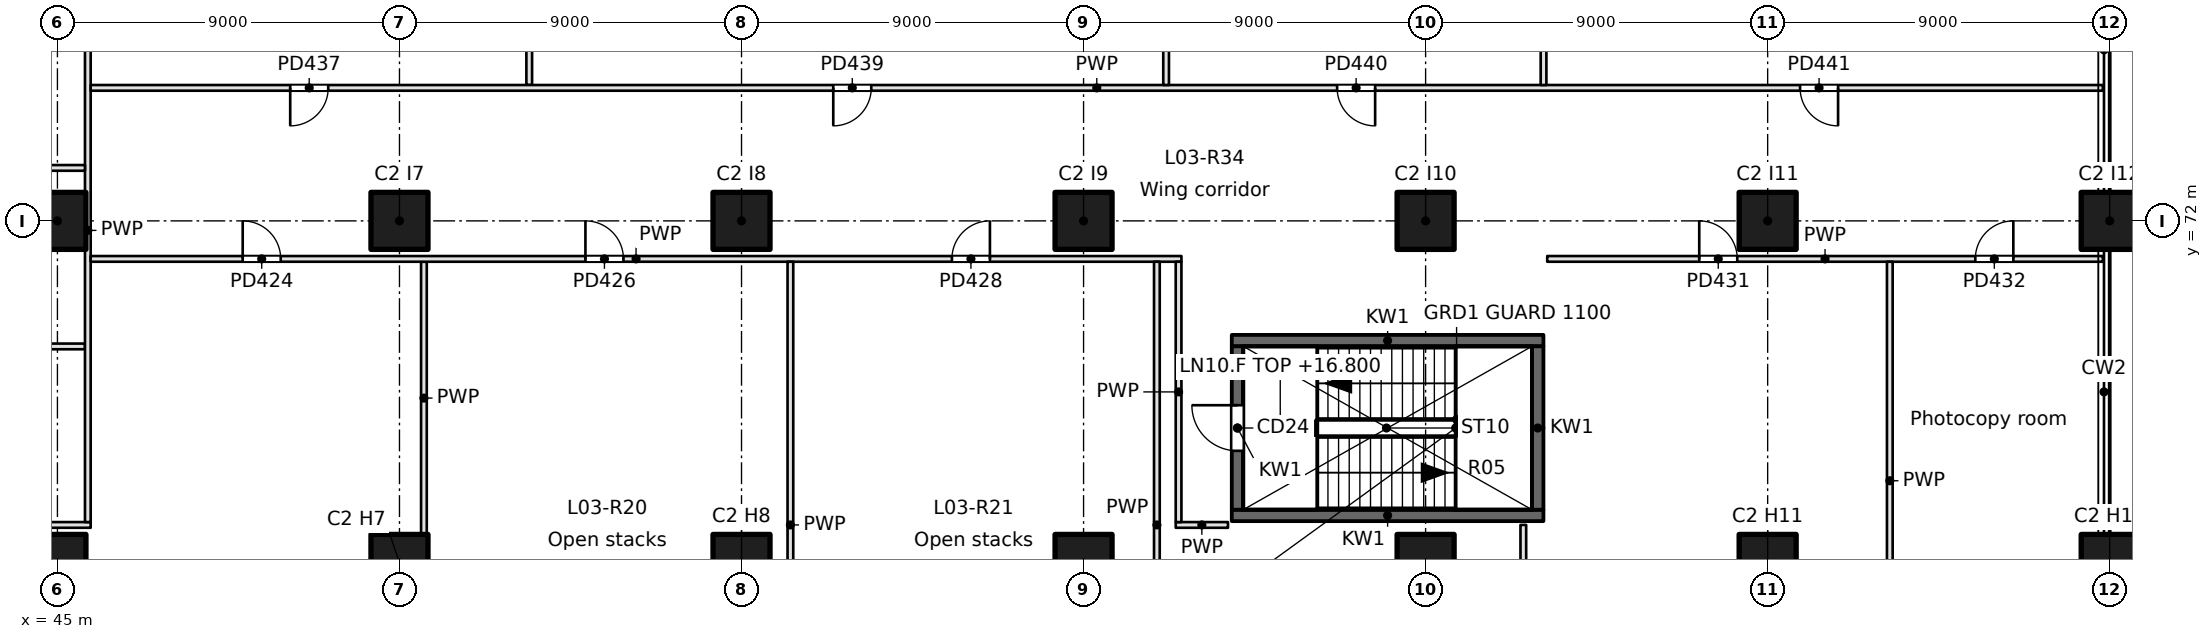
"""IFC4 building model, lengths in metres.
Left out: names, types, materials, properties, quantities, classifications, styles, units other than length and angle.
Written with IfcOpenShell. Run it as: python <this file> out.ifc"""

import sys

from ifc_helpers import new_model, si_unit, direction, frame, frame_2d, origin, origin_2d, place, context, subcontext, project, spatial, rectangle, extrude, element, fill, save


model = new_model("IFC4")
c1 = context("Model", 3, precision=1e-05, world=origin(), true_north=direction((0.0, 1.0)))
c2 = subcontext(c1, "Body", "Model", "MODEL_VIEW")
j1 = project(units=[si_unit("LENGTHUNIT", "METRE"), si_unit("PLANEANGLEUNIT", "RADIAN")], contexts=[c1])
p1 = place(None, origin())
s1 = spatial("IfcSite", under=j1, at=p1, CompositionType="ELEMENT")
p2 = place(p1, origin())
s2 = spatial("IfcBuilding", under=s1, at=p2, CompositionType="ELEMENT")
p3 = place(p2, frame((0.0, 0.0, 16.8)))
s3 = spatial("IfcBuildingStorey", under=s2, at=p3, CompositionType="ELEMENT", Elevation=16.8)
for number, where, z_axis, x_axis in (
    (1, (99.0, 63.0, 0.0), (0.0, 0.0, 1.0), (1.0, 0.0, 0.0)),
    (2, (99.0, 72.0, 0.0), (0.0, 0.0, 1.0), (1.0, 0.0, 0.0)),
    (3, (45.0, 63.0, 0.0), (0.0, 0.0, 1.0), (1.0, 0.0, 0.0)),
    (4, (45.0, 72.0, 0.0), (0.0, 0.0, 1.0), (1.0, 0.0, 0.0)),
    (5, (54.0, 63.0, 0.0), (0.0, 0.0, 1.0), (1.0, 0.0, 0.0)),
    (6, (54.0, 72.0, 0.0), (0.0, 0.0, 1.0), (1.0, 0.0, 0.0)),
    (7, (63.0, 63.0, 0.0), (0.0, 0.0, 1.0), (1.0, 0.0, 0.0)),
    (8, (63.0, 72.0, 0.0), (0.0, 0.0, 1.0), (1.0, 0.0, 0.0)),
    (9, (72.0, 63.0, 0.0), (0.0, 0.0, 1.0), (1.0, 0.0, 0.0)),
    (10, (72.0, 72.0, 0.0), (0.0, 0.0, 1.0), (1.0, 0.0, 0.0)),
    (11, (81.0, 63.0, 0.0), (0.0, 0.0, 1.0), (1.0, 0.0, 0.0)),
    (12, (81.0, 72.0, 0.0), (0.0, 0.0, 1.0), (1.0, 0.0, 0.0)),
    (13, (90.0, 63.0, 0.0), (0.0, 0.0, 1.0), (1.0, 0.0, 0.0)),
    (14, (90.0, 72.0, 0.0), (0.0, 0.0, 1.0), (1.0, 0.0, 0.0)),
):
    element("IfcColumn", number, at=place(p3, frame(where, z_axis=z_axis, x_axis=x_axis)), inside=s3, PredefinedType="COLUMN", context=c2, shape_type="SweptSolid", body=[
        extrude(rectangle(XDim=1.5, YDim=1.5, at=origin_2d()), origin(), (0.0, 0.0, 1.0), 4.8),
    ])
for number, where, z_axis, x_axis in (
    (15, (75.9, 64.25, -0.35), (0.0, 0.0, 1.0), (1.0, 0.0, 0.0)),
    (16, (75.9, 68.85, -0.35), (0.0, 0.0, 1.0), (1.0, 0.0, 0.0)),
):
    element("IfcWall", number, at=place(p3, frame(where, z_axis=z_axis, x_axis=x_axis)), inside=s3, PredefinedType="SOLIDWALL", context=c2, shape_type="SweptSolid", body=[
        extrude(rectangle(XDim=8.2, YDim=0.3, at=frame_2d((4.1, 0.0))), origin(), (0.0, 0.0, 1.0), 4.8),
    ])
p4 = place(p3, frame((76.05, 64.4, -0.35), z_axis=(0.0, 0.0, 1.0), x_axis=(0.0, 1.0, 0.0)))
e17 = element("IfcWall", 17, at=p4, inside=s3, PredefinedType="SOLIDWALL", context=c2, shape_type="SweptSolid", body=[
    extrude(rectangle(XDim=4.3, YDim=0.3, at=frame_2d((2.15, 0.0))), origin(), (0.0, 0.0, 1.0), 4.8),
])
p5 = place(p4, frame((1.55, 0.0, 0.35)))
e18 = element("IfcOpeningElement", 18, at=p5, cuts=e17, PredefinedType="OPENING", context=c2, shape_type="SweptSolid", body=[
    extrude(rectangle(XDim=1.2, YDim=2.1, at=frame_2d((0.6, 1.05))), frame((0.0, 0.15, 0.0), z_axis=(0.0, -1.0, 0.0), x_axis=(1.0, 0.0, 0.0)), (0.0, 0.0, 1.0), 0.3),
])
p6 = place(p3, frame((83.95, 64.4, -0.35), z_axis=(0.0, 0.0, 1.0), x_axis=(0.0, 1.0, 0.0)))
e19 = element("IfcWall", 19, at=p6, inside=s3, PredefinedType="SOLIDWALL", context=c2, shape_type="SweptSolid", body=[
    extrude(rectangle(XDim=4.3, YDim=0.3, at=frame_2d((2.15, 0.0))), origin(), (0.0, 0.0, 1.0), 4.8),
])
p7 = place(p3, frame((40.575, 68.697, 0.0), z_axis=(0.0, 0.0, 1.0), x_axis=(1.0, 0.0, 0.0)))
e20 = element("IfcWall", 20, at=p7, inside=s3, PredefinedType="PARTITIONING", context=c2, shape_type="SweptSolid", body=[
    extrude(rectangle(XDim=5.15, YDim=0.15, at=frame_2d((2.575, 0.0))), origin(), (0.0, 0.0, 1.0), 4.45),
])
p8 = place(p3, frame((45.875, 64.0, 0.0), z_axis=(0.0, 0.0, 1.0), x_axis=(-1.0, 0.0, 0.0)))
e21 = element("IfcWall", 21, at=p8, inside=s3, PredefinedType="PARTITIONING", context=c2, shape_type="SweptSolid", body=[
    extrude(rectangle(XDim=5.45, YDim=0.15, at=frame_2d((2.725, 0.0))), origin(), (0.0, 0.0, 1.0), 4.45),
])
p9 = place(p3, frame((74.425, 64.0, 0.0), z_axis=(0.0, 0.0, 1.0), x_axis=(1.0, 0.0, 0.0)))
e22 = element("IfcWall", 22, at=p9, inside=s3, PredefinedType="PARTITIONING", context=c2, shape_type="SweptSolid", body=[
    extrude(rectangle(XDim=1.375, YDim=0.15, at=frame_2d((0.688, 0.0))), origin(), (0.0, 0.0, 1.0), 4.45),
])
p10 = place(p3, frame((45.8, 79.425, 0.0), z_axis=(0.0, 0.0, 1.0), x_axis=(0.0, -1.0, 0.0)))
e23 = element("IfcWall", 23, at=p10, inside=s3, PredefinedType="PARTITIONING", context=c2, shape_type="SweptSolid", body=[
    extrude(rectangle(XDim=15.35, YDim=0.15, at=frame_2d((7.675, 0.0))), origin(), (0.0, 0.0, 1.0), 4.45),
])
p11 = place(p3, frame((40.575, 73.394, 0.0), z_axis=(0.0, 0.0, 1.0), x_axis=(1.0, 0.0, 0.0)))
e24 = element("IfcWall", 24, at=p11, inside=s3, PredefinedType="PARTITIONING", context=c2, shape_type="SweptSolid", body=[
    extrude(rectangle(XDim=5.15, YDim=0.15, at=frame_2d((2.575, 0.0))), origin(), (0.0, 0.0, 1.0), 4.45),
])
p12 = place(p3, frame((54.643, 63.75, 0.0), z_axis=(0.0, 0.0, 1.0), x_axis=(0.0, 1.0, 0.0)))
e25 = element("IfcWall", 25, at=p12, inside=s3, PredefinedType="PARTITIONING", context=c2, shape_type="SweptSolid", body=[
    extrude(rectangle(XDim=7.175, YDim=0.15, at=frame_2d((3.587, 0.0))), origin(), (0.0, 0.0, 1.0), 4.45),
])
p13 = place(p3, frame((45.875, 71.0, 0.0), z_axis=(0.0, 0.0, 1.0), x_axis=(1.0, 0.0, 0.0)))
e26 = element("IfcWall", 26, at=p13, inside=s3, PredefinedType="PARTITIONING", context=c2, shape_type="SweptSolid", body=[
    extrude(rectangle(XDim=28.7, YDim=0.15, at=frame_2d((14.35, 0.0))), origin(), (0.0, 0.0, 1.0), 4.45),
])
p14 = place(p13, frame((4.0, 0.0, 0.0)))
e27 = element("IfcOpeningElement", 27, at=p14, cuts=e26, PredefinedType="OPENING", context=c2, shape_type="SweptSolid", body=[
    extrude(rectangle(XDim=1.0, YDim=2.1, at=frame_2d((0.5, 1.05))), frame((0.0, 0.075, 0.0), z_axis=(0.0, -1.0, 0.0), x_axis=(1.0, 0.0, 0.0)), (0.0, 0.0, 1.0), 0.15),
])
p15 = place(p13, frame((13.018, 0.0, 0.0)))
e28 = element("IfcOpeningElement", 28, at=p15, cuts=e26, PredefinedType="OPENING", context=c2, shape_type="SweptSolid", body=[
    extrude(rectangle(XDim=1.0, YDim=2.1, at=frame_2d((0.5, 1.05))), frame((0.0, 0.075, 0.0), z_axis=(0.0, -1.0, 0.0), x_axis=(1.0, 0.0, 0.0)), (0.0, 0.0, 1.0), 0.15),
])
p16 = place(p13, frame((22.661, 0.0, 0.0)))
e29 = element("IfcOpeningElement", 29, at=p16, cuts=e26, PredefinedType="OPENING", context=c2, shape_type="SweptSolid", body=[
    extrude(rectangle(XDim=1.0, YDim=2.1, at=frame_2d((0.5, 1.05))), frame((0.0, 0.075, 0.0), z_axis=(0.0, -1.0, 0.0), x_axis=(1.0, 0.0, 0.0)), (0.0, 0.0, 1.0), 0.15),
])
p17 = place(p3, frame((84.2, 71.0, 0.0), z_axis=(0.0, 0.0, 1.0), x_axis=(1.0, 0.0, 0.0)))
e30 = element("IfcWall", 30, at=p17, inside=s3, PredefinedType="PARTITIONING", context=c2, shape_type="SweptSolid", body=[
    extrude(rectangle(XDim=14.62, YDim=0.15, at=frame_2d((7.31, 0.0))), origin(), (0.0, 0.0, 1.0), 4.45),
])
p18 = place(p17, frame((4.0, 0.0, 0.0)))
e31 = element("IfcOpeningElement", 31, at=p18, cuts=e30, PredefinedType="OPENING", context=c2, shape_type="SweptSolid", body=[
    extrude(rectangle(XDim=1.0, YDim=2.1, at=frame_2d((0.5, 1.05))), frame((0.0, 0.075, 0.0), z_axis=(0.0, -1.0, 0.0), x_axis=(1.0, 0.0, 0.0)), (0.0, 0.0, 1.0), 0.15),
])
p19 = place(p17, frame((11.264, 0.0, 0.0)))
e32 = element("IfcOpeningElement", 32, at=p19, cuts=e30, PredefinedType="OPENING", context=c2, shape_type="SweptSolid", body=[
    extrude(rectangle(XDim=1.0, YDim=2.1, at=frame_2d((0.5, 1.05))), frame((0.0, 0.075, 0.0), z_axis=(0.0, -1.0, 0.0), x_axis=(1.0, 0.0, 0.0)), (0.0, 0.0, 1.0), 0.15),
])
for number, where, z_axis, x_axis in (
    (33, (64.286, 57.075, 0.0), (0.0, 0.0, 1.0), (0.0, 1.0, 0.0)),
    (34, (73.929, 57.075, 0.0), (0.0, 0.0, 1.0), (0.0, 1.0, 0.0)),
):
    element("IfcWall", number, at=place(p3, frame(where, z_axis=z_axis, x_axis=x_axis)), inside=s3, PredefinedType="PARTITIONING", context=c2, shape_type="SweptSolid", body=[
        extrude(rectangle(XDim=13.85, YDim=0.15, at=frame_2d((6.925, 0.0))), origin(), (0.0, 0.0, 1.0), 4.45),
    ])
p20 = place(p3, frame((83.571, 57.075, 0.0), z_axis=(0.0, 0.0, 1.0), x_axis=(0.0, 1.0, 0.0)))
e35 = element("IfcWall", 35, at=p20, inside=s3, PredefinedType="PARTITIONING", context=c2, shape_type="SweptSolid", body=[
    extrude(rectangle(XDim=6.925, YDim=0.15, at=frame_2d((3.462, 0.0))), origin(), (0.0, 0.0, 1.0), 4.45),
])
p21 = place(p3, frame((74.5, 70.925, 0.0), z_axis=(0.0, 0.0, 1.0), x_axis=(0.0, -1.0, 0.0)))
e36 = element("IfcWall", 36, at=p21, inside=s3, PredefinedType="PARTITIONING", context=c2, shape_type="SweptSolid", body=[
    extrude(rectangle(XDim=6.85, YDim=0.15, at=frame_2d((3.425, 0.0))), origin(), (0.0, 0.0, 1.0), 4.45),
])
p22 = place(p3, frame((93.214, 59.4, 0.0), z_axis=(0.0, 0.0, 1.0), x_axis=(0.0, 1.0, 0.0)))
e37 = element("IfcWall", 37, at=p22, inside=s3, PredefinedType="PARTITIONING", context=c2, shape_type="SweptSolid", body=[
    extrude(rectangle(XDim=11.525, YDim=0.15, at=frame_2d((5.763, 0.0))), origin(), (0.0, 0.0, 1.0), 4.45),
])
p23 = place(p3, frame((57.414, 75.575, 0.0), z_axis=(0.0, 0.0, 1.0), x_axis=(0.0, 1.0, 0.0)))
e38 = element("IfcWall", 38, at=p23, inside=s3, PredefinedType="PARTITIONING", context=c2, shape_type="SweptSolid", body=[
    extrude(rectangle(XDim=17.925, YDim=0.15, at=frame_2d((8.962, 0.0))), origin(), (0.0, 0.0, 1.0), 4.45),
])
p24 = place(p3, frame((98.82, 75.5, 0.0), z_axis=(0.0, 0.0, 1.0), x_axis=(-1.0, 0.0, 0.0)))
e39 = element("IfcWall", 39, at=p24, inside=s3, PredefinedType="PARTITIONING", context=c2, shape_type="SweptSolid", body=[
    extrude(rectangle(XDim=52.945, YDim=0.15, at=frame_2d((26.473, 0.0))), origin(), (0.0, 0.0, 1.0), 4.45),
])
p25 = place(p24, frame((46.695, 0.0, 0.0)))
e40 = element("IfcOpeningElement", 40, at=p25, cuts=e39, PredefinedType="OPENING", context=c2, shape_type="SweptSolid", body=[
    extrude(rectangle(XDim=1.0, YDim=2.1, at=frame_2d((0.5, 1.05))), frame((0.0, 0.075, 0.0), z_axis=(0.0, -1.0, 0.0), x_axis=(1.0, 0.0, 0.0)), (0.0, 0.0, 1.0), 0.15),
])
p26 = place(p24, frame((32.406, 0.0, 0.0)))
e41 = element("IfcOpeningElement", 41, at=p26, cuts=e39, PredefinedType="OPENING", context=c2, shape_type="SweptSolid", body=[
    extrude(rectangle(XDim=1.0, YDim=2.1, at=frame_2d((0.5, 1.05))), frame((0.0, 0.075, 0.0), z_axis=(0.0, -1.0, 0.0), x_axis=(1.0, 0.0, 0.0)), (0.0, 0.0, 1.0), 0.15),
])
p27 = place(p24, frame((19.148, 0.0, 0.0)))
e42 = element("IfcOpeningElement", 42, at=p27, cuts=e39, PredefinedType="OPENING", context=c2, shape_type="SweptSolid", body=[
    extrude(rectangle(XDim=1.0, YDim=2.1, at=frame_2d((0.5, 1.05))), frame((0.0, 0.075, 0.0), z_axis=(0.0, -1.0, 0.0), x_axis=(1.0, 0.0, 0.0)), (0.0, 0.0, 1.0), 0.15),
])
p28 = place(p24, frame((6.967, 0.0, 0.0)))
e43 = element("IfcOpeningElement", 43, at=p28, cuts=e39, PredefinedType="OPENING", context=c2, shape_type="SweptSolid", body=[
    extrude(rectangle(XDim=1.0, YDim=2.1, at=frame_2d((0.5, 1.05))), frame((0.0, 0.075, 0.0), z_axis=(0.0, -1.0, 0.0), x_axis=(1.0, 0.0, 0.0)), (0.0, 0.0, 1.0), 0.15),
])
p29 = place(p3, frame((74.172, 75.575, 0.0), z_axis=(0.0, 0.0, 1.0), x_axis=(0.0, 1.0, 0.0)))
e44 = element("IfcWall", 44, at=p29, inside=s3, PredefinedType="PARTITIONING", context=c2, shape_type="SweptSolid", body=[
    extrude(rectangle(XDim=17.925, YDim=0.15, at=frame_2d((8.962, 0.0))), origin(), (0.0, 0.0, 1.0), 4.45),
])
p30 = place(p3, frame((84.103, 75.575, 0.0), z_axis=(0.0, 0.0, 1.0), x_axis=(0.0, 1.0, 0.0)))
e45 = element("IfcWall", 45, at=p30, inside=s3, PredefinedType="PARTITIONING", context=c2, shape_type="SweptSolid", body=[
    extrude(rectangle(XDim=22.525, YDim=0.15, at=frame_2d((11.263, 0.0))), origin(), (0.0, 0.0, 1.0), 4.45),
])
p31 = place(p5, origin())
e46 = element("IfcDoor", 46, at=p31, inside=s3, OperationType="SINGLE_SWING_RIGHT", PredefinedType="DOOR", context=c2, shape_type="SweptSolid", body=[
    extrude(rectangle(XDim=1.2, YDim=2.1, at=frame_2d((0.6, 1.05))), frame((0.0, 0.025, 0.0), z_axis=(0.0, -1.0, 0.0), x_axis=(1.0, 0.0, 0.0)), (0.0, 0.0, 1.0), 0.05),
])
fill(e18, e46)
p32 = place(p14, origin())
e47 = element("IfcDoor", 47, at=p32, inside=s3, OperationType="SINGLE_SWING_LEFT", PredefinedType="DOOR", context=c2, shape_type="SweptSolid", body=[
    extrude(rectangle(XDim=1.0, YDim=2.1, at=frame_2d((0.5, 1.05))), frame((0.0, 0.025, 0.0), z_axis=(0.0, -1.0, 0.0), x_axis=(1.0, 0.0, 0.0)), (0.0, 0.0, 1.0), 0.05),
])
fill(e27, e47)
p33 = place(p15, origin())
e48 = element("IfcDoor", 48, at=p33, inside=s3, OperationType="SINGLE_SWING_LEFT", PredefinedType="DOOR", context=c2, shape_type="SweptSolid", body=[
    extrude(rectangle(XDim=1.0, YDim=2.1, at=frame_2d((0.5, 1.05))), frame((0.0, 0.025, 0.0), z_axis=(0.0, -1.0, 0.0), x_axis=(1.0, 0.0, 0.0)), (0.0, 0.0, 1.0), 0.05),
])
fill(e28, e48)
p34 = place(p16, origin())
e49 = element("IfcDoor", 49, at=p34, inside=s3, OperationType="SINGLE_SWING_RIGHT", PredefinedType="DOOR", context=c2, shape_type="SweptSolid", body=[
    extrude(rectangle(XDim=1.0, YDim=2.1, at=frame_2d((0.5, 1.05))), frame((0.0, 0.025, 0.0), z_axis=(0.0, -1.0, 0.0), x_axis=(1.0, 0.0, 0.0)), (0.0, 0.0, 1.0), 0.05),
])
fill(e29, e49)
p35 = place(p18, origin())
e50 = element("IfcDoor", 50, at=p35, inside=s3, OperationType="SINGLE_SWING_LEFT", PredefinedType="DOOR", context=c2, shape_type="SweptSolid", body=[
    extrude(rectangle(XDim=1.0, YDim=2.1, at=frame_2d((0.5, 1.05))), frame((0.0, 0.025, 0.0), z_axis=(0.0, -1.0, 0.0), x_axis=(1.0, 0.0, 0.0)), (0.0, 0.0, 1.0), 0.05),
])
fill(e31, e50)
p36 = place(p19, origin())
e51 = element("IfcDoor", 51, at=p36, inside=s3, OperationType="SINGLE_SWING_RIGHT", PredefinedType="DOOR", context=c2, shape_type="SweptSolid", body=[
    extrude(rectangle(XDim=1.0, YDim=2.1, at=frame_2d((0.5, 1.05))), frame((0.0, 0.025, 0.0), z_axis=(0.0, -1.0, 0.0), x_axis=(1.0, 0.0, 0.0)), (0.0, 0.0, 1.0), 0.05),
])
fill(e32, e51)
p37 = place(p25, origin())
e52 = element("IfcDoor", 52, at=p37, inside=s3, OperationType="SINGLE_SWING_RIGHT", PredefinedType="DOOR", context=c2, shape_type="SweptSolid", body=[
    extrude(rectangle(XDim=1.0, YDim=2.1, at=frame_2d((0.5, 1.05))), frame((0.0, 0.025, 0.0), z_axis=(0.0, -1.0, 0.0), x_axis=(1.0, 0.0, 0.0)), (0.0, 0.0, 1.0), 0.05),
])
fill(e40, e52)
p38 = place(p26, origin())
e53 = element("IfcDoor", 53, at=p38, inside=s3, OperationType="SINGLE_SWING_RIGHT", PredefinedType="DOOR", context=c2, shape_type="SweptSolid", body=[
    extrude(rectangle(XDim=1.0, YDim=2.1, at=frame_2d((0.5, 1.05))), frame((0.0, 0.025, 0.0), z_axis=(0.0, -1.0, 0.0), x_axis=(1.0, 0.0, 0.0)), (0.0, 0.0, 1.0), 0.05),
])
fill(e41, e53)
p39 = place(p27, origin())
e54 = element("IfcDoor", 54, at=p39, inside=s3, OperationType="SINGLE_SWING_LEFT", PredefinedType="DOOR", context=c2, shape_type="SweptSolid", body=[
    extrude(rectangle(XDim=1.0, YDim=2.1, at=frame_2d((0.5, 1.05))), frame((0.0, 0.025, 0.0), z_axis=(0.0, -1.0, 0.0), x_axis=(1.0, 0.0, 0.0)), (0.0, 0.0, 1.0), 0.05),
])
fill(e42, e54)
p40 = place(p28, origin())
e55 = element("IfcDoor", 55, at=p40, inside=s3, OperationType="SINGLE_SWING_LEFT", PredefinedType="DOOR", context=c2, shape_type="SweptSolid", body=[
    extrude(rectangle(XDim=1.0, YDim=2.1, at=frame_2d((0.5, 1.05))), frame((0.0, 0.025, 0.0), z_axis=(0.0, -1.0, 0.0), x_axis=(1.0, 0.0, 0.0)), (0.0, 0.0, 1.0), 0.05),
])
fill(e43, e55)
save(model, sys.argv[1])
